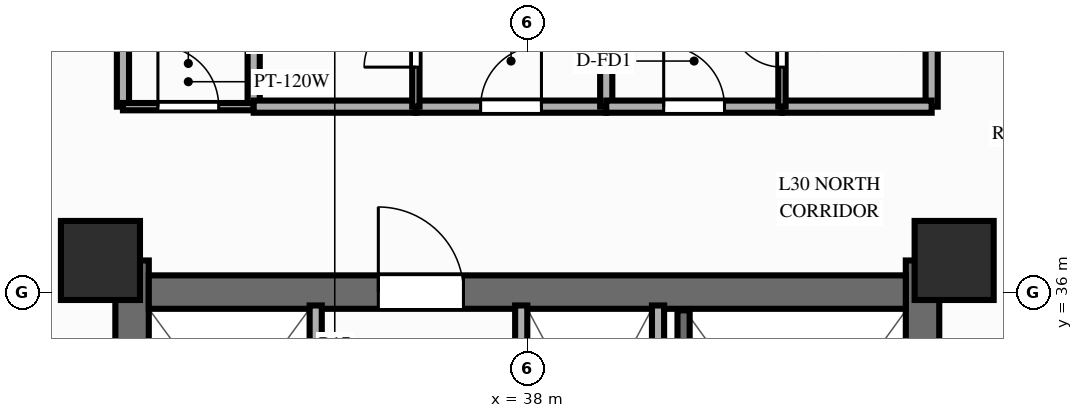
"""IFC4 building model, lengths in metres.
Left out: names, types, materials, properties, quantities, classifications, styles, units other than length and angle.
Written with IfcOpenShell. Run it as: python <this file> out.ifc"""

import sys

from ifc_helpers import new_model, si_unit, direction, frame, frame_2d, origin, origin_2d, place, context, subcontext, project, spatial, rectangle, extrude, source, transform, mapped, element, fill, save


model = new_model("IFC4")
c1 = context("Model", 3, precision=1e-05, world=origin(), true_north=direction((0.0, 1.0)))
c2 = subcontext(c1, "Body", "Model", "MODEL_VIEW")
j1 = project(units=[si_unit("LENGTHUNIT", "METRE"), si_unit("PLANEANGLEUNIT", "RADIAN")], contexts=[c1])
p1 = place(None, origin())
s1 = spatial("IfcSite", under=j1, at=p1, CompositionType="ELEMENT")
p2 = place(p1, origin())
s2 = spatial("IfcBuilding", under=s1, at=p2, CompositionType="ELEMENT")
p3 = place(p2, frame((0.0, 0.0, 95.85)))
s3 = spatial("IfcBuildingStorey", under=s2, at=p3, CompositionType="ELEMENT", Elevation=95.85)
p4 = place(p3, frame((31.5, 17.48, 0.0), z_axis=(0.0, 0.0, 1.0), x_axis=(0.0, 1.0, 0.0)))
e1 = element("IfcWall", 1, at=p4, inside=s3, PredefinedType="SHEAR", context=c2, shape_type="SweptSolid", body=[
    extrude(rectangle(XDim=19.04, YDim=0.55, at=frame_2d((9.52, 0.0))), origin(), (0.0, 0.0, 1.0), 3.0),
])
p5 = place(p4, frame((6.32, 0.0, 0.0)))
e2 = element("IfcOpeningElement", 2, at=p5, cuts=e1, PredefinedType="OPENING", context=c2, shape_type="SweptSolid", body=[
    extrude(rectangle(XDim=1.1, YDim=2.15, at=frame_2d((0.55, 1.075))), frame((0.0, 0.287, 0.0), z_axis=(0.0, -1.0, 0.0), x_axis=(1.0, 0.0, 0.0)), (0.0, 0.0, 1.0), 0.574),
])
p6 = place(p3, frame((44.5, 17.48, 0.0), z_axis=(0.0, 0.0, 1.0), x_axis=(0.0, 1.0, 0.0)))
e3 = element("IfcWall", 3, at=p6, inside=s3, PredefinedType="SHEAR", context=c2, shape_type="SweptSolid", body=[
    extrude(rectangle(XDim=19.04, YDim=0.55, at=frame_2d((9.52, 0.0))), origin(), (0.0, 0.0, 1.0), 3.0),
])
p7 = place(p6, frame((12.67, 0.0, 0.0), z_axis=(0.0, 0.0, 1.0), x_axis=(-1.0, 0.0, 0.0)))
e4 = element("IfcOpeningElement", 4, at=p7, cuts=e3, PredefinedType="OPENING", context=c2, shape_type="SweptSolid", body=[
    extrude(rectangle(XDim=1.1, YDim=2.15, at=frame_2d((0.55, 1.075))), frame((0.0, 0.287, 0.0), z_axis=(0.0, -1.0, 0.0), x_axis=(1.0, 0.0, 0.0)), (0.0, 0.0, 1.0), 0.574),
])
p8 = place(p3, frame((31.775, 36.0, 0.0), z_axis=(0.0, 0.0, 1.0), x_axis=(1.0, 0.0, 0.0)))
e5 = element("IfcWall", 5, at=p8, inside=s3, PredefinedType="SHEAR", context=c2, shape_type="SweptSolid", body=[
    extrude(rectangle(XDim=12.45, YDim=0.55, at=frame_2d((6.225, 0.0))), origin(), (0.0, 0.0, 1.0), 3.0),
])
p9 = place(p8, frame((5.175, 0.0, 0.0), z_axis=(0.0, 0.0, 1.0), x_axis=(-1.0, 0.0, 0.0)))
e6 = element("IfcOpeningElement", 6, at=p9, cuts=e5, PredefinedType="OPENING", context=c2, shape_type="SweptSolid", body=[
    extrude(rectangle(XDim=1.4, YDim=2.15, at=frame_2d((0.7, 1.075))), frame((0.0, 0.287, 0.0), z_axis=(0.0, -1.0, 0.0), x_axis=(1.0, 0.0, 0.0)), (0.0, 0.0, 1.0), 0.574),
])
m1 = source(origin(), c2, "Body", "SweptSolid", [
    extrude(rectangle(XDim=1.3, YDim=1.3, at=origin_2d()), origin(), (0.0, 0.0, 1.0), 3.0),
])
for number, where, z_axis, x_axis in (
    (7, (30.98, 36.52, 0.0), (0.0, 0.0, 1.0), (1.0, 0.0, 0.0)),
    (8, (45.02, 36.52, 0.0), (0.0, 0.0, 1.0), (1.0, 0.0, 0.0)),
):
    element("IfcColumn", number, at=place(p3, frame(where, z_axis=z_axis, x_axis=x_axis)), inside=s3, PredefinedType="COLUMN", context=c2, shape_type="MappedRepresentation", body=[
        mapped(m1, transform((0.0, 0.0, 0.0), scale=1.0)),
    ])
p10 = place(p3, frame((40.15, 31.8, 0.0), z_axis=(0.0, 0.0, 1.0), x_axis=(0.0, 1.0, 0.0)))
e9 = element("IfcWall", 9, at=p10, inside=s3, PredefinedType="PARTITIONING", context=c2, shape_type="SweptSolid", body=[
    extrude(rectangle(XDim=3.98, YDim=0.2, at=frame_2d((1.99, 0.0))), origin(), (0.0, 0.0, 1.0), 2.79),
])
p11 = place(p3, frame((40.57, 28.65, 0.0), z_axis=(0.0, 0.0, 1.0), x_axis=(0.0, 1.0, 0.0)))
e10 = element("IfcWall", 10, at=p11, inside=s3, PredefinedType="SOLIDWALL", context=c2, shape_type="SweptSolid", body=[
    extrude(rectangle(XDim=7.05, YDim=0.2, at=frame_2d((3.525, 0.0))), origin(), (0.0, 0.0, 1.0), 2.79),
])
p12 = place(p3, frame((34.52, 25.44, 0.0), z_axis=(0.0, 0.0, 1.0), x_axis=(0.0, 1.0, 0.0)))
e11 = element("IfcWall", 11, at=p12, inside=s3, PredefinedType="PARTITIONING", context=c2, shape_type="SweptSolid", body=[
    extrude(rectangle(XDim=10.34, YDim=0.2, at=frame_2d((5.17, 0.0))), origin(), (0.0, 0.0, 1.0), 2.79),
])
p13 = place(p12, frame((1.15, 0.0, 0.0)))
e12 = element("IfcOpeningElement", 12, at=p13, cuts=e11, PredefinedType="OPENING", context=c2, shape_type="SweptSolid", body=[
    extrude(rectangle(XDim=0.9, YDim=2.1, at=frame_2d((0.45, 1.05))), frame((0.0, 0.112, 0.0), z_axis=(0.0, -1.0, 0.0), x_axis=(1.0, 0.0, 0.0)), (0.0, 0.0, 1.0), 0.224),
])
p14 = place(p12, frame((4.35, 0.0, 0.0)))
e13 = element("IfcOpeningElement", 13, at=p14, cuts=e11, PredefinedType="OPENING", context=c2, shape_type="SweptSolid", body=[
    extrude(rectangle(XDim=0.9, YDim=2.1, at=frame_2d((0.45, 1.05))), frame((0.0, 0.112, 0.0), z_axis=(0.0, -1.0, 0.0), x_axis=(1.0, 0.0, 0.0)), (0.0, 0.0, 1.0), 0.224),
])
p15 = place(p3, frame((37.9, 25.44, 0.0), z_axis=(0.0, 0.0, 1.0), x_axis=(0.0, 1.0, 0.0)))
e14 = element("IfcWall", 14, at=p15, inside=s3, PredefinedType="PARTITIONING", context=c2, shape_type="SweptSolid", body=[
    extrude(rectangle(XDim=10.34, YDim=0.2, at=frame_2d((5.17, 0.0))), origin(), (0.0, 0.0, 1.0), 2.79),
])
p16 = place(p15, frame((0.32, 0.0, 0.0)))
e15 = element("IfcOpeningElement", 15, at=p16, cuts=e14, PredefinedType="OPENING", context=c2, shape_type="SweptSolid", body=[
    extrude(rectangle(XDim=1.0, YDim=2.15, at=frame_2d((0.5, 1.075))), frame((0.0, 0.112, 0.0), z_axis=(0.0, -1.0, 0.0), x_axis=(1.0, 0.0, 0.0)), (0.0, 0.0, 1.0), 0.224),
])
p17 = place(p15, frame((1.71, 0.0, 0.0)))
e16 = element("IfcOpeningElement", 16, at=p17, cuts=e14, PredefinedType="OPENING", context=c2, shape_type="SweptSolid", body=[
    extrude(rectangle(XDim=1.0, YDim=2.15, at=frame_2d((0.5, 1.075))), frame((0.0, 0.112, 0.0), z_axis=(0.0, -1.0, 0.0), x_axis=(1.0, 0.0, 0.0)), (0.0, 0.0, 1.0), 0.224),
])
p18 = place(p15, frame((3.51, 0.0, 0.0)))
e17 = element("IfcOpeningElement", 17, at=p18, cuts=e14, PredefinedType="OPENING", context=c2, shape_type="SweptSolid", body=[
    extrude(rectangle(XDim=1.0, YDim=2.15, at=frame_2d((0.5, 1.075))), frame((0.0, 0.112, 0.0), z_axis=(0.0, -1.0, 0.0), x_axis=(1.0, 0.0, 0.0)), (0.0, 0.0, 1.0), 0.224),
])
p19 = place(p15, frame((5.01, 0.0, 0.0)))
e18 = element("IfcOpeningElement", 18, at=p19, cuts=e14, PredefinedType="OPENING", context=c2, shape_type="SweptSolid", body=[
    extrude(rectangle(XDim=1.0, YDim=2.15, at=frame_2d((0.5, 1.075))), frame((0.0, 0.112, 0.0), z_axis=(0.0, -1.0, 0.0), x_axis=(1.0, 0.0, 0.0)), (0.0, 0.0, 1.0), 0.224),
])
for number, where, z_axis, x_axis in (
    (19, (31.35, 39.05, 0.0), (0.0, 0.0, 1.0), (0.0, 1.0, 0.0)),
    (20, (44.65, 39.05, 0.0), (0.0, 0.0, 1.0), (0.0, 1.0, 0.0)),
):
    element("IfcWall", number, at=place(p3, frame(where, z_axis=z_axis, x_axis=x_axis)), inside=s3, PredefinedType="PARTITIONING", context=c2, shape_type="SweptSolid", body=[
        extrude(rectangle(XDim=11.8, YDim=0.2, at=frame_2d((5.9, 0.0))), origin(), (0.0, 0.0, 1.0), 2.34),
    ])
p20 = place(p3, frame((33.5, 39.05, 0.0), z_axis=(0.0, 0.0, 1.0), x_axis=(0.0, 1.0, 0.0)))
e21 = element("IfcWall", 21, at=p20, inside=s3, PredefinedType="PARTITIONING", context=c2, shape_type="SweptSolid", body=[
    extrude(rectangle(XDim=11.8, YDim=0.2, at=frame_2d((5.9, 0.0))), origin(), (0.0, 0.0, 1.0), 2.79),
])
p21 = place(p3, frame((31.35, 39.05, 0.0), z_axis=(0.0, 0.0, 1.0), x_axis=(1.0, 0.0, 0.0)))
e22 = element("IfcWall", 22, at=p21, inside=s3, PredefinedType="PARTITIONING", context=c2, shape_type="SweptSolid", body=[
    extrude(rectangle(XDim=2.15, YDim=0.12, at=frame_2d((1.075, 0.0))), origin(), (0.0, 0.0, 1.0), 2.79),
])
p22 = place(p21, frame((0.575, 0.0, 0.0)))
e23 = element("IfcOpeningElement", 23, at=p22, cuts=e22, PredefinedType="OPENING", context=c2, shape_type="SweptSolid", body=[
    extrude(rectangle(XDim=1.0, YDim=2.1, at=frame_2d((0.5, 1.05))), frame((0.0, 0.072, 0.0), z_axis=(0.0, -1.0, 0.0), x_axis=(1.0, 0.0, 0.0)), (0.0, 0.0, 1.0), 0.144),
])
p23 = place(p3, frame((33.5, 39.05, 0.0), z_axis=(0.0, 0.0, 1.0), x_axis=(1.0, 0.0, 0.0)))
e24 = element("IfcWall", 24, at=p23, inside=s3, PredefinedType="PARTITIONING", context=c2, shape_type="SweptSolid", body=[
    extrude(rectangle(XDim=2.667, YDim=0.2, at=frame_2d((1.333, 0.0))), origin(), (0.0, 0.0, 1.0), 2.79),
])
p24 = place(p3, frame((36.167, 39.05, 0.0), z_axis=(0.0, 0.0, 1.0), x_axis=(1.0, 0.0, 0.0)))
e25 = element("IfcWall", 25, at=p24, inside=s3, PredefinedType="PARTITIONING", context=c2, shape_type="SweptSolid", body=[
    extrude(rectangle(XDim=3.131, YDim=0.2, at=frame_2d((1.565, 0.0))), origin(), (0.0, 0.0, 1.0), 2.79),
])
p25 = place(p24, frame((1.065, 0.0, 0.0)))
e26 = element("IfcOpeningElement", 26, at=p25, cuts=e25, PredefinedType="OPENING", context=c2, shape_type="SweptSolid", body=[
    extrude(rectangle(XDim=1.0, YDim=2.15, at=frame_2d((0.5, 1.075))), frame((0.0, 0.112, 0.0), z_axis=(0.0, -1.0, 0.0), x_axis=(1.0, 0.0, 0.0)), (0.0, 0.0, 1.0), 0.224),
])
p26 = place(p3, frame((36.167, 39.05, 0.0), z_axis=(0.0, 0.0, 1.0), x_axis=(0.0, 1.0, 0.0)))
e27 = element("IfcWall", 27, at=p26, inside=s3, PredefinedType="PARTITIONING", context=c2, shape_type="SweptSolid", body=[
    extrude(rectangle(XDim=2.15, YDim=0.12, at=frame_2d((1.075, 0.0))), origin(), (0.0, 0.0, 1.0), 2.79),
])
p27 = place(p26, frame((0.65, 0.0, 0.0)))
e28 = element("IfcOpeningElement", 28, at=p27, cuts=e27, PredefinedType="OPENING", context=c2, shape_type="SweptSolid", body=[
    extrude(rectangle(XDim=0.85, YDim=2.05, at=frame_2d((0.425, 1.025))), frame((0.0, 0.072, 0.0), z_axis=(0.0, -1.0, 0.0), x_axis=(1.0, 0.0, 0.0)), (0.0, 0.0, 1.0), 0.144),
])
p28 = place(p3, frame((39.298, 39.05, 0.0), z_axis=(0.0, 0.0, 1.0), x_axis=(0.0, 1.0, 0.0)))
e29 = element("IfcWall", 29, at=p28, inside=s3, PredefinedType="PARTITIONING", context=c2, shape_type="SweptSolid", body=[
    extrude(rectangle(XDim=11.8, YDim=0.2, at=frame_2d((5.9, 0.0))), origin(), (0.0, 0.0, 1.0), 2.79),
])
p29 = place(p3, frame((39.298, 39.05, 0.0), z_axis=(0.0, 0.0, 1.0), x_axis=(1.0, 0.0, 0.0)))
e30 = element("IfcWall", 30, at=p29, inside=s3, PredefinedType="PARTITIONING", context=c2, shape_type="SweptSolid", body=[
    extrude(rectangle(XDim=2.89, YDim=0.2, at=frame_2d((1.445, 0.0))), origin(), (0.0, 0.0, 1.0), 2.79),
])
p30 = place(p29, frame((0.945, 0.0, 0.0)))
e31 = element("IfcOpeningElement", 31, at=p30, cuts=e30, PredefinedType="OPENING", context=c2, shape_type="SweptSolid", body=[
    extrude(rectangle(XDim=1.0, YDim=2.15, at=frame_2d((0.5, 1.075))), frame((0.0, 0.112, 0.0), z_axis=(0.0, -1.0, 0.0), x_axis=(1.0, 0.0, 0.0)), (0.0, 0.0, 1.0), 0.224),
])
p31 = place(p3, frame((42.188, 39.05, 0.0), z_axis=(0.0, 0.0, 1.0), x_axis=(1.0, 0.0, 0.0)))
e32 = element("IfcWall", 32, at=p31, inside=s3, PredefinedType="PARTITIONING", context=c2, shape_type="SweptSolid", body=[
    extrude(rectangle(XDim=2.462, YDim=0.2, at=frame_2d((1.231, 0.0))), origin(), (0.0, 0.0, 1.0), 2.79),
])
p32 = place(p3, frame((42.188, 39.05, 0.0), z_axis=(0.0, 0.0, 1.0), x_axis=(0.0, 1.0, 0.0)))
e33 = element("IfcWall", 33, at=p32, inside=s3, PredefinedType="PARTITIONING", context=c2, shape_type="SweptSolid", body=[
    extrude(rectangle(XDim=2.15, YDim=0.12, at=frame_2d((1.075, 0.0))), origin(), (0.0, 0.0, 1.0), 2.79),
])
p33 = place(p32, frame((0.65, 0.0, 0.0)))
e34 = element("IfcOpeningElement", 34, at=p33, cuts=e33, PredefinedType="OPENING", context=c2, shape_type="SweptSolid", body=[
    extrude(rectangle(XDim=0.85, YDim=2.05, at=frame_2d((0.425, 1.025))), frame((0.0, 0.072, 0.0), z_axis=(0.0, -1.0, 0.0), x_axis=(1.0, 0.0, 0.0)), (0.0, 0.0, 1.0), 0.144),
])
m2 = source(origin(), c2, "Body", "SweptSolid", [
    extrude(rectangle(XDim=1.4, YDim=2.15, at=frame_2d((0.7, 1.075))), frame((0.0, 0.025, 0.0), z_axis=(0.0, -1.0, 0.0), x_axis=(1.0, 0.0, 0.0)), (0.0, 0.0, 1.0), 0.05),
])
p34 = place(p9, origin())
e35 = element("IfcDoor", 35, at=p34, inside=s3, OperationType="SINGLE_SWING_RIGHT", PredefinedType="DOOR", context=c2, shape_type="MappedRepresentation", body=[
    mapped(m2, transform((0.0, 0.0, 0.0), scale=1.0)),
])
fill(e6, e35)
m3 = source(origin(), c2, "Body", "SweptSolid", [
    extrude(rectangle(XDim=1.0, YDim=2.1, at=frame_2d((0.5, 1.05))), frame((0.0, 0.025, 0.0), z_axis=(0.0, -1.0, 0.0), x_axis=(1.0, 0.0, 0.0)), (0.0, 0.0, 1.0), 0.05),
])
p35 = place(p22, origin())
e36 = element("IfcDoor", 36, at=p35, inside=s3, OperationType="SINGLE_SWING_LEFT", PredefinedType="DOOR", context=c2, shape_type="MappedRepresentation", body=[
    mapped(m3, transform((0.0, 0.0, 0.0), scale=1.0)),
])
fill(e23, e36)
m4 = source(origin(), c2, "Body", "SweptSolid", [
    extrude(rectangle(XDim=1.0, YDim=2.15, at=frame_2d((0.5, 1.075))), frame((0.0, 0.025, 0.0), z_axis=(0.0, -1.0, 0.0), x_axis=(1.0, 0.0, 0.0)), (0.0, 0.0, 1.0), 0.05),
])
p36 = place(p25, origin())
e37 = element("IfcDoor", 37, at=p36, inside=s3, OperationType="SINGLE_SWING_RIGHT", PredefinedType="DOOR", context=c2, shape_type="MappedRepresentation", body=[
    mapped(m4, transform((0.0, 0.0, 0.0), scale=1.0)),
])
fill(e26, e37)
m5 = source(origin(), c2, "Body", "SweptSolid", [
    extrude(rectangle(XDim=0.85, YDim=2.05, at=frame_2d((0.425, 1.025))), frame((0.0, 0.025, 0.0), z_axis=(0.0, -1.0, 0.0), x_axis=(1.0, 0.0, 0.0)), (0.0, 0.0, 1.0), 0.05),
])
p37 = place(p27, origin())
e38 = element("IfcDoor", 38, at=p37, inside=s3, OperationType="SINGLE_SWING_LEFT", PredefinedType="DOOR", context=c2, shape_type="MappedRepresentation", body=[
    mapped(m5, transform((0.0, 0.0, 0.0), scale=1.0)),
])
fill(e28, e38)
p38 = place(p30, origin())
e39 = element("IfcDoor", 39, at=p38, inside=s3, OperationType="SINGLE_SWING_LEFT", PredefinedType="DOOR", context=c2, shape_type="MappedRepresentation", body=[
    mapped(m4, transform((0.0, 0.0, 0.0), scale=1.0)),
])
fill(e31, e39)
p39 = place(p33, origin())
e40 = element("IfcDoor", 40, at=p39, inside=s3, OperationType="SINGLE_SWING_RIGHT", PredefinedType="DOOR", context=c2, shape_type="MappedRepresentation", body=[
    mapped(m5, transform((0.0, 0.0, 0.0), scale=1.0)),
])
fill(e34, e40)
save(model, sys.argv[1])
